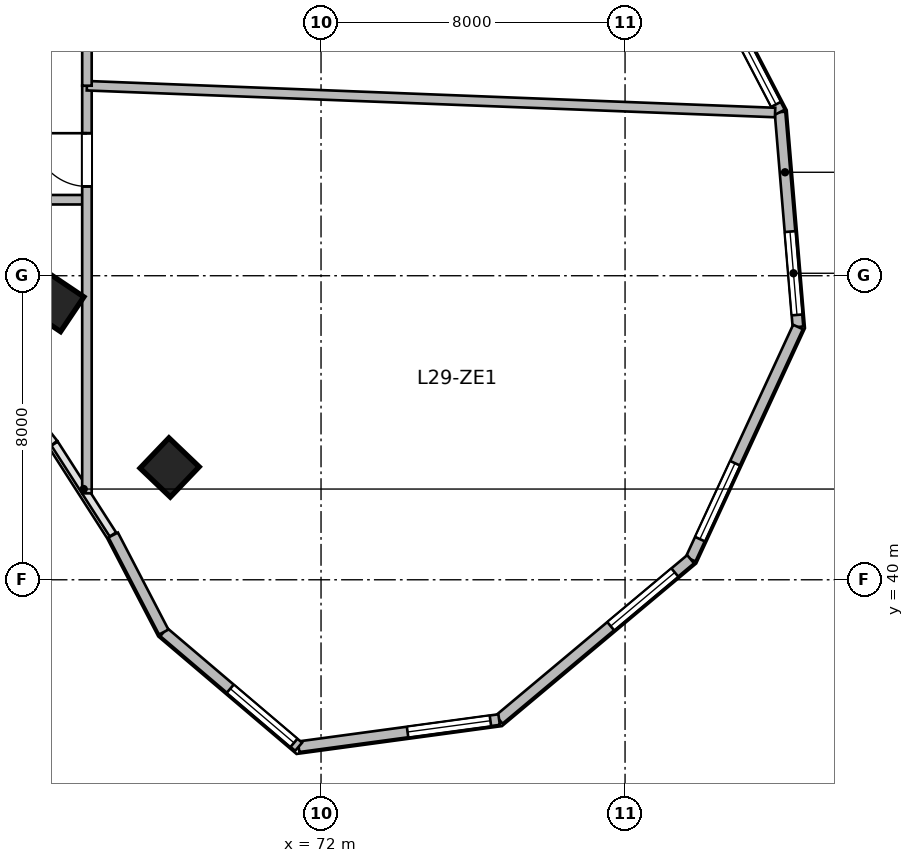
"""IFC4 building model, lengths in metres.
Left out: names, types, materials, properties, quantities, classifications, styles, units other than length and angle.
Written with IfcOpenShell. Run it as: python <this file> out.ifc"""

import sys

from ifc_helpers import new_model, si_unit, direction, frame, frame_2d, origin, origin_2d, place, context, subcontext, project, spatial, rectangle, extrude, source, transform, mapped, element, fill, save


model = new_model("IFC4")
c1 = context("Model", 3, precision=1e-05, world=origin(), true_north=direction((0.0, 1.0)))
c2 = subcontext(c1, "Body", "Model", "MODEL_VIEW")
j1 = project(units=[si_unit("LENGTHUNIT", "METRE"), si_unit("PLANEANGLEUNIT", "RADIAN")], contexts=[c1])
p1 = place(None, origin())
s1 = spatial("IfcSite", under=j1, at=p1, CompositionType="ELEMENT")
p2 = place(p1, origin())
s2 = spatial("IfcBuilding", under=s1, at=p2, CompositionType="ELEMENT")
p3 = place(p2, frame((0.0, 0.0, 123.3)))
s3 = spatial("IfcBuildingStorey", under=s2, at=p3, CompositionType="ELEMENT", Elevation=123.3)
m1 = source(origin(), c2, "Body", "SweptSolid", [
    extrude(rectangle(XDim=1.1, YDim=1.1, at=origin_2d()), origin(), (0.0, 0.0, 1.0), 3.9),
])
for number, where, z_axis, x_axis in (
    (1, (64.996, 47.294, 0.0), (0.0, 0.0, 1.0), (0.558, 0.83, 0.0)),
    (2, (68.015, 42.955, 0.0), (0.0, 0.0, 1.0), (0.691, 0.723, 0.0)),
):
    element("IfcColumn", number, at=place(p3, frame(where, z_axis=z_axis, x_axis=x_axis)), inside=s3, PredefinedType="COLUMN", context=c2, shape_type="MappedRepresentation", body=[
        mapped(m1, transform((0.0, 0.0, 0.0), scale=1.0)),
    ])
m2 = source(origin(), c2, "Body", "SweptSolid", [
    extrude(rectangle(XDim=5.674, YDim=0.28, at=frame_2d((2.837, 0.0))), origin(), (0.0, 0.0, 1.0), 3.65),
])
p4 = place(p3, frame((84.078, 52.305, 0.0), z_axis=(0.0, 0.0, 1.0), x_axis=(0.083309007867, -0.996523762491, 0.0)))
e3 = element("IfcWall", 3, at=p4, inside=s3, PredefinedType="SOLIDWALL", context=c2, shape_type="MappedRepresentation", body=[
    mapped(m2, transform((0.0, 0.0, 0.0), scale=1.0)),
])
p5 = place(p4, frame((3.155, 0.0, 0.95)))
e4 = element("IfcOpeningElement", 4, at=p5, cuts=e3, PredefinedType="OPENING", context=c2, shape_type="SweptSolid", body=[
    extrude(rectangle(XDim=2.2, YDim=2.1, at=frame_2d((1.1, 1.05))), frame((0.0, 0.15, 0.0), z_axis=(0.0, -1.0, 0.0), x_axis=(1.0, 0.0, 0.0)), (0.0, 0.0, 1.0), 0.3),
])
m3 = source(origin(), c2, "Body", "SweptSolid", [
    extrude(rectangle(XDim=6.732, YDim=0.28, at=frame_2d((3.366, 0.0))), origin(), (0.0, 0.0, 1.0), 3.65),
])
p6 = place(p3, frame((84.55, 46.652, 0.0), z_axis=(0.0, 0.0, 1.0), x_axis=(-0.419644552709, -0.907688520023, 0.0)))
e5 = element("IfcWall", 5, at=p6, inside=s3, PredefinedType="SOLIDWALL", context=c2, shape_type="MappedRepresentation", body=[
    mapped(m3, transform((0.0, 0.0, 0.0), scale=1.0)),
])
p7 = place(p6, frame((3.949, 0.0, 0.95)))
e6 = element("IfcOpeningElement", 6, at=p7, cuts=e5, PredefinedType="OPENING", context=c2, shape_type="SweptSolid", body=[
    extrude(rectangle(XDim=2.2, YDim=2.1, at=frame_2d((1.1, 1.05))), frame((0.0, 0.15, 0.0), z_axis=(0.0, -1.0, 0.0), x_axis=(1.0, 0.0, 0.0)), (0.0, 0.0, 1.0), 0.3),
])
m4 = source(origin(), c2, "Body", "SweptSolid", [
    extrude(rectangle(XDim=6.573, YDim=0.28, at=frame_2d((3.287, 0.0))), origin(), (0.0, 0.0, 1.0), 3.65),
])
p8 = place(p3, frame((81.725, 40.541, 0.0), z_axis=(0.0, 0.0, 1.0), x_axis=(-0.766715154163, -0.641987439423, 0.0)))
e7 = element("IfcWall", 7, at=p8, inside=s3, PredefinedType="SOLIDWALL", context=c2, shape_type="MappedRepresentation", body=[
    mapped(m4, transform((0.0, 0.0, 0.0), scale=1.0)),
])
p9 = place(p8, frame((0.543, 0.0, 0.95)))
e8 = element("IfcOpeningElement", 8, at=p9, cuts=e7, PredefinedType="OPENING", context=c2, shape_type="SweptSolid", body=[
    extrude(rectangle(XDim=2.2, YDim=2.1, at=frame_2d((1.1, 1.05))), frame((0.0, 0.15, 0.0), z_axis=(0.0, -1.0, 0.0), x_axis=(1.0, 0.0, 0.0)), (0.0, 0.0, 1.0), 0.3),
])
m5 = source(origin(), c2, "Body", "SweptSolid", [
    extrude(rectangle(XDim=5.324, YDim=0.28, at=frame_2d((2.662, 0.0))), origin(), (0.0, 0.0, 1.0), 3.65),
])
p10 = place(p3, frame((76.686, 36.322, 0.0), z_axis=(0.0, 0.0, 1.0), x_axis=(-0.990931467223, -0.134368252451, 0.0)))
e9 = element("IfcWall", 9, at=p10, inside=s3, PredefinedType="SOLIDWALL", context=c2, shape_type="MappedRepresentation", body=[
    mapped(m5, transform((0.0, 0.0, 0.0), scale=1.0)),
])
p11 = place(p10, frame((0.231, 0.0, 0.95)))
e10 = element("IfcOpeningElement", 10, at=p11, cuts=e9, PredefinedType="OPENING", context=c2, shape_type="SweptSolid", body=[
    extrude(rectangle(XDim=2.2, YDim=2.1, at=frame_2d((1.1, 1.05))), frame((0.0, 0.15, 0.0), z_axis=(0.0, -1.0, 0.0), x_axis=(1.0, 0.0, 0.0)), (0.0, 0.0, 1.0), 0.3),
])
m6 = source(origin(), c2, "Body", "SweptSolid", [
    extrude(rectangle(XDim=4.659, YDim=0.28, at=frame_2d((2.33, 0.0))), origin(), (0.0, 0.0, 1.0), 3.65),
])
p12 = place(p3, frame((71.41, 35.606, 0.0), z_axis=(0.0, 0.0, 1.0), x_axis=(-0.761913458795, 0.647678841176, 0.0)))
e11 = element("IfcWall", 11, at=p12, inside=s3, PredefinedType="SOLIDWALL", context=c2, shape_type="MappedRepresentation", body=[
    mapped(m6, transform((0.0, 0.0, 0.0), scale=1.0)),
])
p13 = place(p12, frame((0.16, 0.0, 0.95)))
e12 = element("IfcOpeningElement", 12, at=p13, cuts=e11, PredefinedType="OPENING", context=c2, shape_type="SweptSolid", body=[
    extrude(rectangle(XDim=2.2, YDim=2.1, at=frame_2d((1.1, 1.05))), frame((0.0, 0.15, 0.0), z_axis=(0.0, -1.0, 0.0), x_axis=(1.0, 0.0, 0.0)), (0.0, 0.0, 1.0), 0.3),
])
m7 = source(origin(), c2, "Body", "SweptSolid", [
    extrude(rectangle(XDim=2.88, YDim=0.28, at=frame_2d((1.44, 0.0))), origin(), (0.0, 0.0, 1.0), 3.65),
])
p14 = place(p3, frame((67.861, 38.624, 0.0), z_axis=(0.0, 0.0, 1.0), x_axis=(-0.461769086658, 0.887000175088, 0.0)))
e13 = element("IfcWall", 13, at=p14, inside=s3, PredefinedType="SOLIDWALL", context=c2, shape_type="MappedRepresentation", body=[
    mapped(m7, transform((0.0, 0.0, 0.0), scale=1.0)),
])
m8 = source(origin(), c2, "Body", "SweptSolid", [
    extrude(rectangle(XDim=5.315, YDim=0.28, at=frame_2d((2.658, 0.0))), origin(), (0.0, 0.0, 1.0), 3.65),
])
p15 = place(p3, frame((81.623, 57.02, 0.0), z_axis=(0.0, 0.0, 1.0), x_axis=(0.461760527822, -0.887004630735, 0.0)))
e14 = element("IfcWall", 14, at=p15, inside=s3, PredefinedType="SOLIDWALL", context=c2, shape_type="MappedRepresentation", body=[
    mapped(m8, transform((0.0, 0.0, 0.0), scale=1.0)),
])
p16 = place(p15, frame((2.886, 0.0, 0.95)))
e15 = element("IfcOpeningElement", 15, at=p16, cuts=e14, PredefinedType="OPENING", context=c2, shape_type="SweptSolid", body=[
    extrude(rectangle(XDim=2.2, YDim=2.1, at=frame_2d((1.1, 1.05))), frame((0.0, 0.15, 0.0), z_axis=(0.0, -1.0, 0.0), x_axis=(1.0, 0.0, 0.0)), (0.0, 0.0, 1.0), 0.3),
])
m9 = source(origin(), c2, "Body", "SweptSolid", [
    extrude(rectangle(XDim=2.5, YDim=0.25, at=frame_2d((1.25, 0.0))), origin(), (0.0, 0.0, 1.0), 3.65),
])
p17 = place(p3, frame((63.3, 50.0, 0.0), z_axis=(0.0, 0.0, 1.0), x_axis=(1.0, 0.0, 0.0)))
e16 = element("IfcWall", 16, at=p17, inside=s3, PredefinedType="PARTITIONING", context=c2, shape_type="MappedRepresentation", body=[
    mapped(m9, transform((0.0, 0.0, 0.0), scale=1.0)),
])
m10 = source(origin(), c2, "Body", "SweptSolid", [
    extrude(rectangle(XDim=10.726, YDim=0.25, at=frame_2d((5.363, 0.0))), origin(), (0.0, 0.0, 1.0), 2.942),
])
p18 = place(p3, frame((65.84, 42.274, 0.0), z_axis=(0.0, 0.0, 1.0), x_axis=(0.0, 1.0, 0.0)))
e17 = element("IfcWall", 17, at=p18, inside=s3, PredefinedType="PARTITIONING", context=c2, shape_type="MappedRepresentation", body=[
    mapped(m10, transform((0.0, 0.0, 0.0), scale=1.0)),
])
p19 = place(p18, frame((8.076, 0.0, 0.0)))
e18 = element("IfcOpeningElement", 18, at=p19, cuts=e17, PredefinedType="OPENING", context=c2, shape_type="SweptSolid", body=[
    extrude(rectangle(XDim=1.4, YDim=2.15, at=frame_2d((0.7, 1.075))), frame((0.0, 0.135, 0.0), z_axis=(0.0, -1.0, 0.0), x_axis=(1.0, 0.0, 0.0)), (0.0, 0.0, 1.0), 0.27),
])
m11 = source(origin(), c2, "Body", "SweptSolid", [
    extrude(rectangle(XDim=18.122, YDim=0.25, at=frame_2d((9.061, 0.0))), origin(), (0.0, 0.0, 1.0), 3.65),
])
p20 = place(p3, frame((65.84, 53.0, 0.0), z_axis=(0.0, 0.0, 1.0), x_axis=(0.999241241773, -0.038947923447, 0.0)))
e19 = element("IfcWall", 19, at=p20, inside=s3, PredefinedType="PARTITIONING", context=c2, shape_type="MappedRepresentation", body=[
    mapped(m11, transform((0.0, 0.0, 0.0), scale=1.0)),
])
m12 = source(origin(), c2, "Body", "SweptSolid", [
    extrude(rectangle(XDim=7.0, YDim=0.25, at=frame_2d((3.5, 0.0))), origin(), (0.0, 0.0, 1.0), 3.093),
])
p21 = place(p3, frame((65.84, 53.0, 0.0), z_axis=(0.0, 0.0, 1.0), x_axis=(0.0, 1.0, 0.0)))
e20 = element("IfcWall", 20, at=p21, inside=s3, PredefinedType="PARTITIONING", context=c2, shape_type="MappedRepresentation", body=[
    mapped(m12, transform((0.0, 0.0, 0.0), scale=1.0)),
])
p22 = place(p21, frame((2.8, 0.0, 0.0)))
e21 = element("IfcOpeningElement", 21, at=p22, cuts=e20, PredefinedType="OPENING", context=c2, shape_type="SweptSolid", body=[
    extrude(rectangle(XDim=1.4, YDim=2.15, at=frame_2d((0.7, 1.075))), frame((0.0, 0.135, 0.0), z_axis=(0.0, -1.0, 0.0), x_axis=(1.0, 0.0, 0.0)), (0.0, 0.0, 1.0), 0.27),
])
m13 = source(origin(), c2, "Body", "SweptSolid", [
    extrude(rectangle(XDim=2.2, YDim=2.1, at=frame_2d((1.1, 1.05))), frame((0.0, 0.03, 0.0), z_axis=(0.0, -1.0, 0.0), x_axis=(1.0, 0.0, 0.0)), (0.0, 0.0, 1.0), 0.06),
])
p23 = place(p5, origin())
e22 = element("IfcWindow", 22, at=p23, inside=s3, PartitioningType="TRIPLE_PANEL_VERTICAL", PredefinedType="WINDOW", context=c2, shape_type="MappedRepresentation", body=[
    mapped(m13, transform((0.0, 0.0, 0.0), scale=1.0)),
])
fill(e4, e22)
p24 = place(p7, origin())
e23 = element("IfcWindow", 23, at=p24, inside=s3, PartitioningType="TRIPLE_PANEL_VERTICAL", PredefinedType="WINDOW", context=c2, shape_type="MappedRepresentation", body=[
    mapped(m13, transform((0.0, 0.0, 0.0), scale=1.0)),
])
fill(e6, e23)
p25 = place(p9, origin())
e24 = element("IfcWindow", 24, at=p25, inside=s3, PartitioningType="TRIPLE_PANEL_VERTICAL", PredefinedType="WINDOW", context=c2, shape_type="MappedRepresentation", body=[
    mapped(m13, transform((0.0, 0.0, 0.0), scale=1.0)),
])
fill(e8, e24)
p26 = place(p11, origin())
e25 = element("IfcWindow", 25, at=p26, inside=s3, PartitioningType="TRIPLE_PANEL_VERTICAL", PredefinedType="WINDOW", context=c2, shape_type="MappedRepresentation", body=[
    mapped(m13, transform((0.0, 0.0, 0.0), scale=1.0)),
])
fill(e10, e25)
p27 = place(p13, origin())
e26 = element("IfcWindow", 26, at=p27, inside=s3, PartitioningType="TRIPLE_PANEL_VERTICAL", PredefinedType="WINDOW", context=c2, shape_type="MappedRepresentation", body=[
    mapped(m13, transform((0.0, 0.0, 0.0), scale=1.0)),
])
fill(e12, e26)
p28 = place(p16, origin())
e27 = element("IfcWindow", 27, at=p28, inside=s3, PartitioningType="TRIPLE_PANEL_VERTICAL", PredefinedType="WINDOW", context=c2, shape_type="MappedRepresentation", body=[
    mapped(m13, transform((0.0, 0.0, 0.0), scale=1.0)),
])
fill(e15, e27)
m14 = source(origin(), c2, "Body", "SweptSolid", [
    extrude(rectangle(XDim=1.4, YDim=2.15, at=frame_2d((0.7, 1.075))), frame((0.0, 0.025, 0.0), z_axis=(0.0, -1.0, 0.0), x_axis=(1.0, 0.0, 0.0)), (0.0, 0.0, 1.0), 0.05),
])
p29 = place(p19, origin())
e28 = element("IfcDoor", 28, at=p29, inside=s3, OperationType="SINGLE_SWING_RIGHT", PredefinedType="DOOR", context=c2, shape_type="MappedRepresentation", body=[
    mapped(m14, transform((0.0, 0.0, 0.0), scale=1.0)),
])
fill(e18, e28)
save(model, sys.argv[1])
